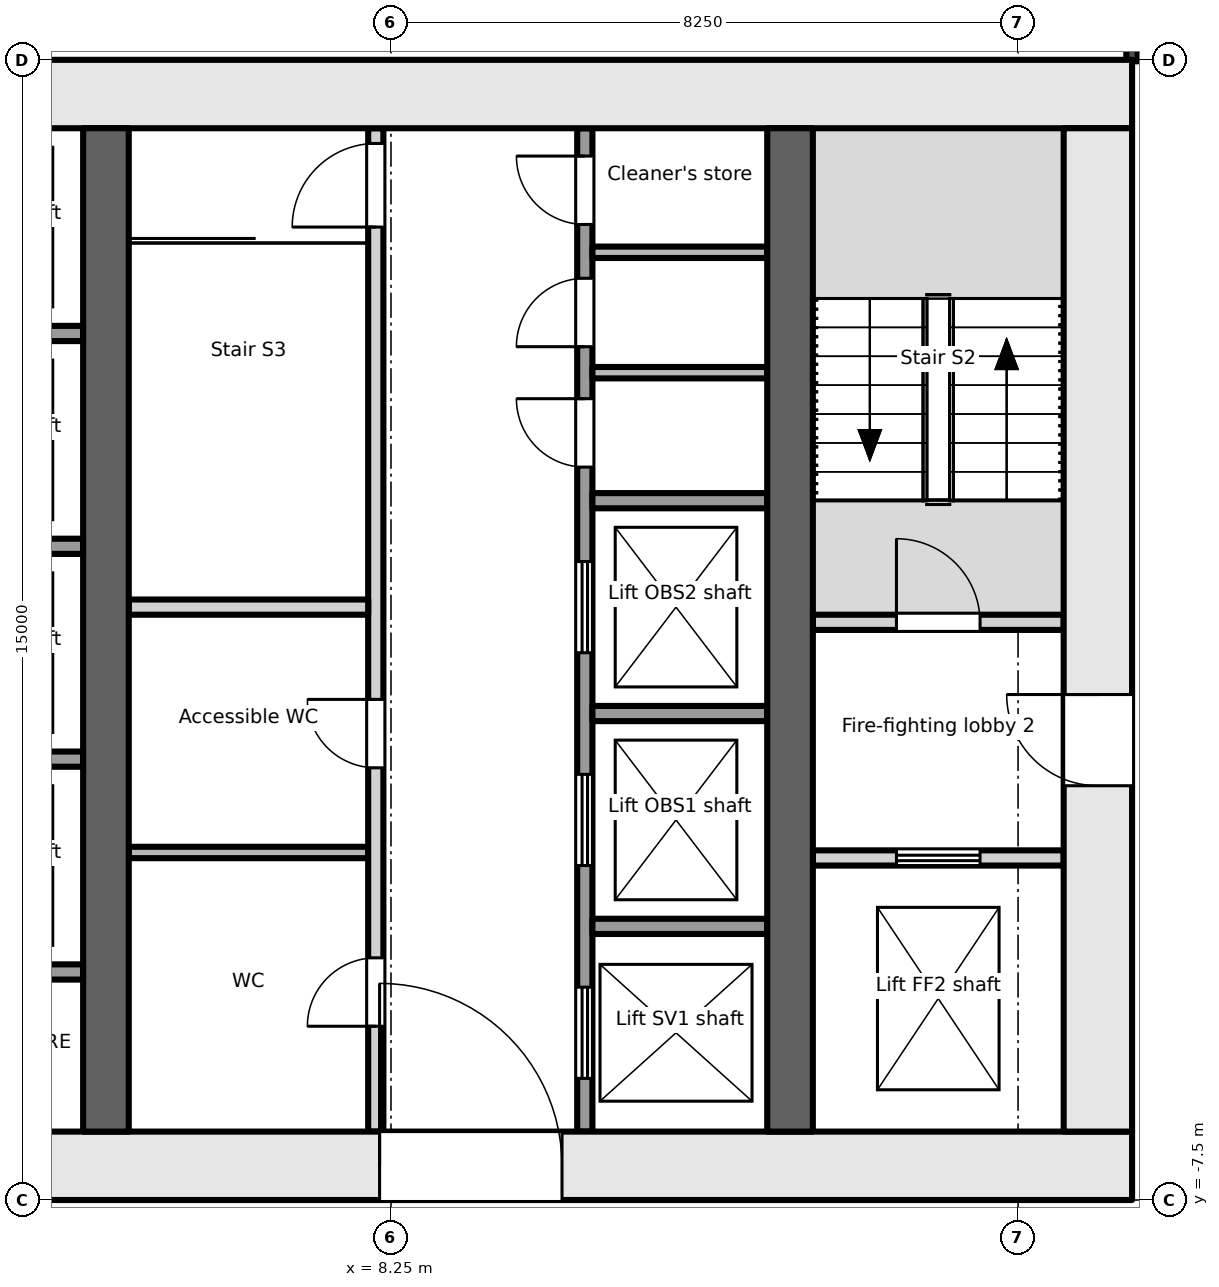
"""IFC4 building model, lengths in metres.
Left out: names, types, materials, properties, quantities, classifications, styles, units other than length and angle.
Written with IfcOpenShell. Run it as: python <this file> out.ifc"""

import sys

from ifc_helpers import new_model, si_unit, direction, frame, frame_2d, origin, place, context, subcontext, project, spatial, rectangle, extrude, element, fill, save


model = new_model("IFC4")
c1 = context("Model", 3, precision=1e-05, world=origin(), true_north=direction((0.0, 1.0)))
c2 = subcontext(c1, "Body", "Model", "MODEL_VIEW")
j1 = project(units=[si_unit("LENGTHUNIT", "METRE"), si_unit("PLANEANGLEUNIT", "RADIAN")], contexts=[c1])
p1 = place(None, origin())
s1 = spatial("IfcSite", under=j1, at=p1, CompositionType="ELEMENT")
p2 = place(p1, origin())
s2 = spatial("IfcBuilding", under=s1, at=p2, CompositionType="ELEMENT")
p3 = place(p2, frame((0.0, 0.0, 286.3)))
s3 = spatial("IfcBuildingStorey", under=s2, at=p3, CompositionType="ELEMENT", Elevation=286.3)
p4 = place(p3, frame((-18.0, -7.05, -0.2), z_axis=(0.0, 0.0, 1.0), x_axis=(1.0, 0.0, 0.0)))
e1 = element("IfcWall", 1, at=p4, inside=s3, PredefinedType="SHEAR", context=c2, shape_type="SweptSolid", body=[
    extrude(rectangle(XDim=36.0, YDim=0.9, at=frame_2d((18.0, 0.0))), origin(), (0.0, 0.0, 1.0), 6.0),
])
p5 = place(p4, frame((4.9, 0.0, 0.2)))
e2 = element("IfcOpeningElement", 2, at=p5, cuts=e1, PredefinedType="OPENING", context=c2, shape_type="SweptSolid", body=[
    extrude(rectangle(XDim=1.8, YDim=2.1, at=frame_2d((0.9, 1.05))), frame((0.0, 0.46, 0.0), z_axis=(0.0, -1.0, 0.0), x_axis=(1.0, 0.0, 0.0)), (0.0, 0.0, 1.0), 0.921),
])
p6 = place(p4, frame((16.8, 0.0, 0.2)))
e3 = element("IfcOpeningElement", 3, at=p6, cuts=e1, PredefinedType="OPENING", context=c2, shape_type="SweptSolid", body=[
    extrude(rectangle(XDim=2.4, YDim=2.1, at=frame_2d((1.2, 1.05))), frame((0.0, 0.46, 0.0), z_axis=(0.0, -1.0, 0.0), x_axis=(1.0, 0.0, 0.0)), (0.0, 0.0, 1.0), 0.921),
])
p7 = place(p4, frame((26.1, 0.0, 0.2)))
e4 = element("IfcOpeningElement", 4, at=p7, cuts=e1, PredefinedType="OPENING", context=c2, shape_type="SweptSolid", body=[
    extrude(rectangle(XDim=2.4, YDim=2.1, at=frame_2d((1.2, 1.05))), frame((0.0, 0.46, 0.0), z_axis=(0.0, -1.0, 0.0), x_axis=(1.0, 0.0, 0.0)), (0.0, 0.0, 1.0), 0.921),
])
p8 = place(p3, frame((-18.0, 7.05, -0.2), z_axis=(0.0, 0.0, 1.0), x_axis=(1.0, 0.0, 0.0)))
e5 = element("IfcWall", 5, at=p8, inside=s3, PredefinedType="SHEAR", context=c2, shape_type="SweptSolid", body=[
    extrude(rectangle(XDim=36.0, YDim=0.9, at=frame_2d((18.0, 0.0))), origin(), (0.0, 0.0, 1.0), 6.0),
])
p9 = place(p3, frame((17.55, -6.6, -0.2), z_axis=(0.0, 0.0, 1.0), x_axis=(0.0, 1.0, 0.0)))
e6 = element("IfcWall", 6, at=p9, inside=s3, PredefinedType="SHEAR", context=c2, shape_type="SweptSolid", body=[
    extrude(rectangle(XDim=13.2, YDim=0.9, at=frame_2d((6.6, 0.0))), origin(), (0.0, 0.0, 1.0), 6.0),
])
p10 = place(p9, frame((4.55, 0.0, 0.2)))
e7 = element("IfcOpeningElement", 7, at=p10, cuts=e6, PredefinedType="OPENING", context=c2, shape_type="SweptSolid", body=[
    extrude(rectangle(XDim=1.2, YDim=2.1, at=frame_2d((0.6, 1.05))), frame((0.0, 0.46, 0.0), z_axis=(0.0, -1.0, 0.0), x_axis=(1.0, 0.0, 0.0)), (0.0, 0.0, 1.0), 0.921),
])
for number, where, z_axis, x_axis in (
    (8, (4.5, -6.6, -0.2), (0.0, 0.0, 1.0), (0.0, 1.0, 0.0)),
    (9, (13.5, -6.6, -0.2), (0.0, 0.0, 1.0), (0.0, 1.0, 0.0)),
):
    element("IfcWall", number, at=place(p3, frame(where, z_axis=z_axis, x_axis=x_axis)), inside=s3, PredefinedType="SHEAR", context=c2, shape_type="SweptSolid", body=[
        extrude(rectangle(XDim=13.2, YDim=0.6, at=frame_2d((6.6, 0.0))), origin(), (0.0, 0.0, 1.0), 6.0),
    ])
p11 = place(p3, frame((13.8, -3.0, 0.0), z_axis=(0.0, 0.0, 1.0), x_axis=(1.0, 0.0, 0.0)))
e10 = element("IfcWall", 10, at=p11, inside=s3, PredefinedType="PARTITIONING", context=c2, shape_type="SweptSolid", body=[
    extrude(rectangle(XDim=3.3, YDim=0.2, at=frame_2d((1.65, 0.0))), origin(), (0.0, 0.0, 1.0), 5.8),
])
p12 = place(p11, frame((1.1, 0.0, 0.0)))
e11 = element("IfcOpeningElement", 11, at=p12, cuts=e10, PredefinedType="OPENING", context=c2, shape_type="SweptSolid", body=[
    extrude(rectangle(XDim=1.1, YDim=2.1, at=frame_2d((0.55, 1.05))), frame((0.0, 0.111, 0.0), z_axis=(0.0, -1.0, 0.0), x_axis=(1.0, 0.0, 0.0)), (0.0, 0.0, 1.0), 0.221),
])
p13 = place(p3, frame((13.8, 0.1, 0.0), z_axis=(0.0, 0.0, 1.0), x_axis=(1.0, 0.0, 0.0)))
e12 = element("IfcWall", 12, at=p13, inside=s3, PredefinedType="PARTITIONING", context=c2, shape_type="SweptSolid", body=[
    extrude(rectangle(XDim=3.3, YDim=0.2, at=frame_2d((1.65, 0.0))), origin(), (0.0, 0.0, 1.0), 5.8),
])
p14 = place(p13, frame((1.1, 0.0, 0.0)))
e13 = element("IfcOpeningElement", 13, at=p14, cuts=e12, PredefinedType="OPENING", context=c2, shape_type="SweptSolid", body=[
    extrude(rectangle(XDim=1.1, YDim=2.1, at=frame_2d((0.55, 1.05))), frame((0.0, 0.111, 0.0), z_axis=(0.0, -1.0, 0.0), x_axis=(1.0, 0.0, 0.0)), (0.0, 0.0, 1.0), 0.221),
])
for number, where, z_axis, x_axis in (
    (14, (1.9, -1.7, 0.0), (0.0, 0.0, 1.0), (1.0, 0.0, 0.0)),
    (15, (1.9, 1.1, 0.0), (0.0, 0.0, 1.0), (1.0, 0.0, 0.0)),
    (16, (1.9, 3.9, 0.0), (0.0, 0.0, 1.0), (1.0, 0.0, 0.0)),
    (17, (1.9, -4.5, 0.0), (0.0, 0.0, 1.0), (1.0, 0.0, 0.0)),
):
    element("IfcWall", number, at=place(p3, frame(where, z_axis=z_axis, x_axis=x_axis)), inside=s3, PredefinedType="PARTITIONING", context=c2, shape_type="SweptSolid", body=[
        extrude(rectangle(XDim=2.3, YDim=0.2, at=frame_2d((1.15, 0.0))), origin(), (0.0, 0.0, 1.0), 5.8),
    ])
p15 = place(p3, frame((8.05, -6.6, 0.0), z_axis=(0.0, 0.0, 1.0), x_axis=(0.0, 1.0, 0.0)))
e18 = element("IfcWall", 18, at=p15, inside=s3, PredefinedType="PARTITIONING", context=c2, shape_type="SweptSolid", body=[
    extrude(rectangle(XDim=13.2, YDim=0.2, at=frame_2d((6.6, 0.0))), origin(), (0.0, 0.0, 1.0), 5.8),
])
p16 = place(p15, frame((1.386, 0.0, 0.0)))
e19 = element("IfcOpeningElement", 19, at=p16, cuts=e18, PredefinedType="OPENING", context=c2, shape_type="SweptSolid", body=[
    extrude(rectangle(XDim=0.9, YDim=2.1, at=frame_2d((0.45, 1.05))), frame((0.0, 0.111, 0.0), z_axis=(0.0, -1.0, 0.0), x_axis=(1.0, 0.0, 0.0)), (0.0, 0.0, 1.0), 0.221),
])
p17 = place(p15, frame((4.786, 0.0, 0.0)))
e20 = element("IfcOpeningElement", 20, at=p17, cuts=e18, PredefinedType="OPENING", context=c2, shape_type="SweptSolid", body=[
    extrude(rectangle(XDim=0.9, YDim=2.1, at=frame_2d((0.45, 1.05))), frame((0.0, 0.111, 0.0), z_axis=(0.0, -1.0, 0.0), x_axis=(1.0, 0.0, 0.0)), (0.0, 0.0, 1.0), 0.221),
])
p18 = place(p15, frame((11.9, 0.0, 0.0)))
e21 = element("IfcOpeningElement", 21, at=p18, cuts=e18, PredefinedType="OPENING", context=c2, shape_type="SweptSolid", body=[
    extrude(rectangle(XDim=1.1, YDim=2.1, at=frame_2d((0.55, 1.05))), frame((0.0, 0.111, 0.0), z_axis=(0.0, -1.0, 0.0), x_axis=(1.0, 0.0, 0.0)), (0.0, 0.0, 1.0), 0.221),
])
p19 = place(p3, frame((10.8, -6.6, 0.0), z_axis=(0.0, 0.0, 1.0), x_axis=(0.0, 1.0, 0.0)))
e22 = element("IfcWall", 22, at=p19, inside=s3, PredefinedType="PARTITIONING", context=c2, shape_type="SweptSolid", body=[
    extrude(rectangle(XDim=13.2, YDim=0.2, at=frame_2d((6.6, 0.0))), origin(), (0.0, 0.0, 1.0), 5.8),
])
p20 = place(p19, frame((0.7, 0.0, 0.0)))
e23 = element("IfcOpeningElement", 23, at=p20, cuts=e22, PredefinedType="OPENING", context=c2, shape_type="SweptSolid", body=[
    extrude(rectangle(XDim=1.2, YDim=2.1, at=frame_2d((0.6, 1.05))), frame((0.0, 0.111, 0.0), z_axis=(0.0, -1.0, 0.0), x_axis=(1.0, 0.0, 0.0)), (0.0, 0.0, 1.0), 0.221),
])
p21 = place(p19, frame((3.5, 0.0, 0.0)))
e24 = element("IfcOpeningElement", 24, at=p21, cuts=e22, PredefinedType="OPENING", context=c2, shape_type="SweptSolid", body=[
    extrude(rectangle(XDim=1.2, YDim=2.1, at=frame_2d((0.6, 1.05))), frame((0.0, 0.111, 0.0), z_axis=(0.0, -1.0, 0.0), x_axis=(1.0, 0.0, 0.0)), (0.0, 0.0, 1.0), 0.221),
])
p22 = place(p19, frame((6.3, 0.0, 0.0)))
e25 = element("IfcOpeningElement", 25, at=p22, cuts=e22, PredefinedType="OPENING", context=c2, shape_type="SweptSolid", body=[
    extrude(rectangle(XDim=1.2, YDim=2.1, at=frame_2d((0.6, 1.05))), frame((0.0, 0.111, 0.0), z_axis=(0.0, -1.0, 0.0), x_axis=(1.0, 0.0, 0.0)), (0.0, 0.0, 1.0), 0.221),
])
p23 = place(p19, frame((8.742, 0.0, 0.0)))
e26 = element("IfcOpeningElement", 26, at=p23, cuts=e22, PredefinedType="OPENING", context=c2, shape_type="SweptSolid", body=[
    extrude(rectangle(XDim=0.9, YDim=2.1, at=frame_2d((0.45, 1.05))), frame((0.0, 0.111, 0.0), z_axis=(0.0, -1.0, 0.0), x_axis=(1.0, 0.0, 0.0)), (0.0, 0.0, 1.0), 0.221),
])
p24 = place(p19, frame((10.326, 0.0, 0.0)))
e27 = element("IfcOpeningElement", 27, at=p24, cuts=e22, PredefinedType="OPENING", context=c2, shape_type="SweptSolid", body=[
    extrude(rectangle(XDim=0.9, YDim=2.1, at=frame_2d((0.45, 1.05))), frame((0.0, 0.111, 0.0), z_axis=(0.0, -1.0, 0.0), x_axis=(1.0, 0.0, 0.0)), (0.0, 0.0, 1.0), 0.221),
])
p25 = place(p19, frame((11.934, 0.0, 0.0)))
e28 = element("IfcOpeningElement", 28, at=p25, cuts=e22, PredefinedType="OPENING", context=c2, shape_type="SweptSolid", body=[
    extrude(rectangle(XDim=0.9, YDim=2.1, at=frame_2d((0.45, 1.05))), frame((0.0, 0.111, 0.0), z_axis=(0.0, -1.0, 0.0), x_axis=(1.0, 0.0, 0.0)), (0.0, 0.0, 1.0), 0.221),
])
p26 = place(p3, frame((4.8, 0.3, 0.0), z_axis=(0.0, 0.0, 1.0), x_axis=(1.0, 0.0, 0.0)))
e29 = element("IfcWall", 29, at=p26, inside=s3, PredefinedType="PARTITIONING", context=c2, shape_type="SweptSolid", body=[
    extrude(rectangle(XDim=3.15, YDim=0.2, at=frame_2d((1.575, 0.0))), origin(), (0.0, 0.0, 1.0), 5.8),
])
p27 = place(p3, frame((4.8, -2.928, 0.0), z_axis=(0.0, 0.0, 1.0), x_axis=(1.0, 0.0, 0.0)))
e30 = element("IfcWall", 30, at=p27, inside=s3, PredefinedType="PARTITIONING", context=c2, shape_type="SweptSolid", body=[
    extrude(rectangle(XDim=3.15, YDim=0.15, at=frame_2d((1.575, 0.0))), origin(), (0.0, 0.0, 1.0), 5.8),
])
for number, where, z_axis, x_axis in (
    (31, (10.9, -3.9, 0.0), (0.0, 0.0, 1.0), (1.0, 0.0, 0.0)),
    (32, (10.9, -1.1, 0.0), (0.0, 0.0, 1.0), (1.0, 0.0, 0.0)),
    (33, (10.9, 1.7, 0.0), (0.0, 0.0, 1.0), (1.0, 0.0, 0.0)),
):
    element("IfcWall", number, at=place(p3, frame(where, z_axis=z_axis, x_axis=x_axis)), inside=s3, PredefinedType="PARTITIONING", context=c2, shape_type="SweptSolid", body=[
        extrude(rectangle(XDim=2.3, YDim=0.2, at=frame_2d((1.15, 0.0))), origin(), (0.0, 0.0, 1.0), 5.8),
    ])
for number, where, z_axis, x_axis in (
    (34, (10.9, 3.384, 0.0), (0.0, 0.0, 1.0), (1.0, 0.0, 0.0)),
    (35, (10.9, 4.968, 0.0), (0.0, 0.0, 1.0), (1.0, 0.0, 0.0)),
):
    element("IfcWall", number, at=place(p3, frame(where, z_axis=z_axis, x_axis=x_axis)), inside=s3, PredefinedType="PARTITIONING", context=c2, shape_type="SweptSolid", body=[
        extrude(rectangle(XDim=2.3, YDim=0.15, at=frame_2d((1.15, 0.0))), origin(), (0.0, 0.0, 1.0), 5.8),
    ])
p28 = place(p3, frame((17.999, 7.48, 0.0), z_axis=(0.0, 0.0, 1.0), x_axis=(0.0, 1.0, 0.0)))
e36 = element("IfcWall", 36, at=p28, inside=s3, PredefinedType="PARTITIONING", context=c2, shape_type="SweptSolid", body=[
    extrude(rectangle(XDim=7.427, YDim=0.15, at=frame_2d((3.713, 0.0))), origin(), (0.0, 0.0, 1.0), 5.8),
])
p29 = place(p28, frame((1.532, 0.0, 0.0)))
e37 = element("IfcOpeningElement", 37, at=p29, cuts=e36, PredefinedType="OPENING", context=c2, shape_type="SweptSolid", body=[
    extrude(rectangle(XDim=1.8, YDim=2.1, at=frame_2d((0.9, 1.05))), frame((0.0, 0.085, 0.0), z_axis=(0.0, -1.0, 0.0), x_axis=(1.0, 0.0, 0.0)), (0.0, 0.0, 1.0), 0.171),
])
p30 = place(p12, origin())
e38 = element("IfcDoor", 38, at=p30, inside=s3, OperationType="DOUBLE_DOOR_SLIDING", PredefinedType="DOOR", context=c2, shape_type="SweptSolid", body=[
    extrude(rectangle(XDim=1.1, YDim=2.1, at=frame_2d((0.55, 1.05))), frame((0.0, 0.025, 0.0), z_axis=(0.0, -1.0, 0.0), x_axis=(1.0, 0.0, 0.0)), (0.0, 0.0, 1.0), 0.05),
])
fill(e11, e38)
p31 = place(p10, origin())
e39 = element("IfcDoor", 39, at=p31, inside=s3, OperationType="SINGLE_SWING_RIGHT", PredefinedType="DOOR", context=c2, shape_type="SweptSolid", body=[
    extrude(rectangle(XDim=1.2, YDim=2.1, at=frame_2d((0.6, 1.05))), frame((0.0, 0.025, 0.0), z_axis=(0.0, -1.0, 0.0), x_axis=(1.0, 0.0, 0.0)), (0.0, 0.0, 1.0), 0.05),
])
fill(e7, e39)
p32 = place(p14, origin())
e40 = element("IfcDoor", 40, at=p32, inside=s3, OperationType="SINGLE_SWING_LEFT", PredefinedType="DOOR", context=c2, shape_type="SweptSolid", body=[
    extrude(rectangle(XDim=1.1, YDim=2.1, at=frame_2d((0.55, 1.05))), frame((0.0, 0.025, 0.0), z_axis=(0.0, -1.0, 0.0), x_axis=(1.0, 0.0, 0.0)), (0.0, 0.0, 1.0), 0.05),
])
fill(e13, e40)
p33 = place(p16, origin())
e41 = element("IfcDoor", 41, at=p33, inside=s3, OperationType="SINGLE_SWING_LEFT", PredefinedType="DOOR", context=c2, shape_type="SweptSolid", body=[
    extrude(rectangle(XDim=0.9, YDim=2.1, at=frame_2d((0.45, 1.05))), frame((0.0, 0.025, 0.0), z_axis=(0.0, -1.0, 0.0), x_axis=(1.0, 0.0, 0.0)), (0.0, 0.0, 1.0), 0.05),
])
fill(e19, e41)
p34 = place(p17, origin())
e42 = element("IfcDoor", 42, at=p34, inside=s3, OperationType="SINGLE_SWING_RIGHT", PredefinedType="DOOR", context=c2, shape_type="SweptSolid", body=[
    extrude(rectangle(XDim=0.9, YDim=2.1, at=frame_2d((0.45, 1.05))), frame((0.0, 0.025, 0.0), z_axis=(0.0, -1.0, 0.0), x_axis=(1.0, 0.0, 0.0)), (0.0, 0.0, 1.0), 0.05),
])
fill(e20, e42)
p35 = place(p18, origin())
e43 = element("IfcDoor", 43, at=p35, inside=s3, OperationType="SINGLE_SWING_LEFT", PredefinedType="DOOR", context=c2, shape_type="SweptSolid", body=[
    extrude(rectangle(XDim=1.1, YDim=2.1, at=frame_2d((0.55, 1.05))), frame((0.0, 0.025, 0.0), z_axis=(0.0, -1.0, 0.0), x_axis=(1.0, 0.0, 0.0)), (0.0, 0.0, 1.0), 0.05),
])
fill(e21, e43)
p36 = place(p7, origin())
e44 = element("IfcDoor", 44, at=p36, inside=s3, OperationType="DOUBLE_DOOR_DOUBLE_SWING", PredefinedType="DOOR", context=c2, shape_type="SweptSolid", body=[
    extrude(rectangle(XDim=2.4, YDim=2.1, at=frame_2d((1.2, 1.05))), frame((0.0, 0.025, 0.0), z_axis=(0.0, -1.0, 0.0), x_axis=(1.0, 0.0, 0.0)), (0.0, 0.0, 1.0), 0.05),
])
fill(e4, e44)
p37 = place(p20, origin())
e45 = element("IfcDoor", 45, at=p37, inside=s3, OperationType="DOUBLE_DOOR_SLIDING", PredefinedType="DOOR", context=c2, shape_type="SweptSolid", body=[
    extrude(rectangle(XDim=1.2, YDim=2.1, at=frame_2d((0.6, 1.05))), frame((0.0, 0.025, 0.0), z_axis=(0.0, -1.0, 0.0), x_axis=(1.0, 0.0, 0.0)), (0.0, 0.0, 1.0), 0.05),
])
fill(e23, e45)
p38 = place(p21, origin())
e46 = element("IfcDoor", 46, at=p38, inside=s3, OperationType="DOUBLE_DOOR_SLIDING", PredefinedType="DOOR", context=c2, shape_type="SweptSolid", body=[
    extrude(rectangle(XDim=1.2, YDim=2.1, at=frame_2d((0.6, 1.05))), frame((0.0, 0.025, 0.0), z_axis=(0.0, -1.0, 0.0), x_axis=(1.0, 0.0, 0.0)), (0.0, 0.0, 1.0), 0.05),
])
fill(e24, e46)
p39 = place(p22, origin())
e47 = element("IfcDoor", 47, at=p39, inside=s3, OperationType="DOUBLE_DOOR_SLIDING", PredefinedType="DOOR", context=c2, shape_type="SweptSolid", body=[
    extrude(rectangle(XDim=1.2, YDim=2.1, at=frame_2d((0.6, 1.05))), frame((0.0, 0.025, 0.0), z_axis=(0.0, -1.0, 0.0), x_axis=(1.0, 0.0, 0.0)), (0.0, 0.0, 1.0), 0.05),
])
fill(e25, e47)
p40 = place(p23, origin())
e48 = element("IfcDoor", 48, at=p40, inside=s3, OperationType="SINGLE_SWING_RIGHT", PredefinedType="DOOR", context=c2, shape_type="SweptSolid", body=[
    extrude(rectangle(XDim=0.9, YDim=2.1, at=frame_2d((0.45, 1.05))), frame((0.0, 0.025, 0.0), z_axis=(0.0, -1.0, 0.0), x_axis=(1.0, 0.0, 0.0)), (0.0, 0.0, 1.0), 0.05),
])
fill(e26, e48)
p41 = place(p24, origin())
e49 = element("IfcDoor", 49, at=p41, inside=s3, OperationType="SINGLE_SWING_LEFT", PredefinedType="DOOR", context=c2, shape_type="SweptSolid", body=[
    extrude(rectangle(XDim=0.9, YDim=2.1, at=frame_2d((0.45, 1.05))), frame((0.0, 0.025, 0.0), z_axis=(0.0, -1.0, 0.0), x_axis=(1.0, 0.0, 0.0)), (0.0, 0.0, 1.0), 0.05),
])
fill(e27, e49)
p42 = place(p25, origin())
e50 = element("IfcDoor", 50, at=p42, inside=s3, OperationType="SINGLE_SWING_RIGHT", PredefinedType="DOOR", context=c2, shape_type="SweptSolid", body=[
    extrude(rectangle(XDim=0.9, YDim=2.1, at=frame_2d((0.45, 1.05))), frame((0.0, 0.025, 0.0), z_axis=(0.0, -1.0, 0.0), x_axis=(1.0, 0.0, 0.0)), (0.0, 0.0, 1.0), 0.05),
])
fill(e28, e50)
save(model, sys.argv[1])
